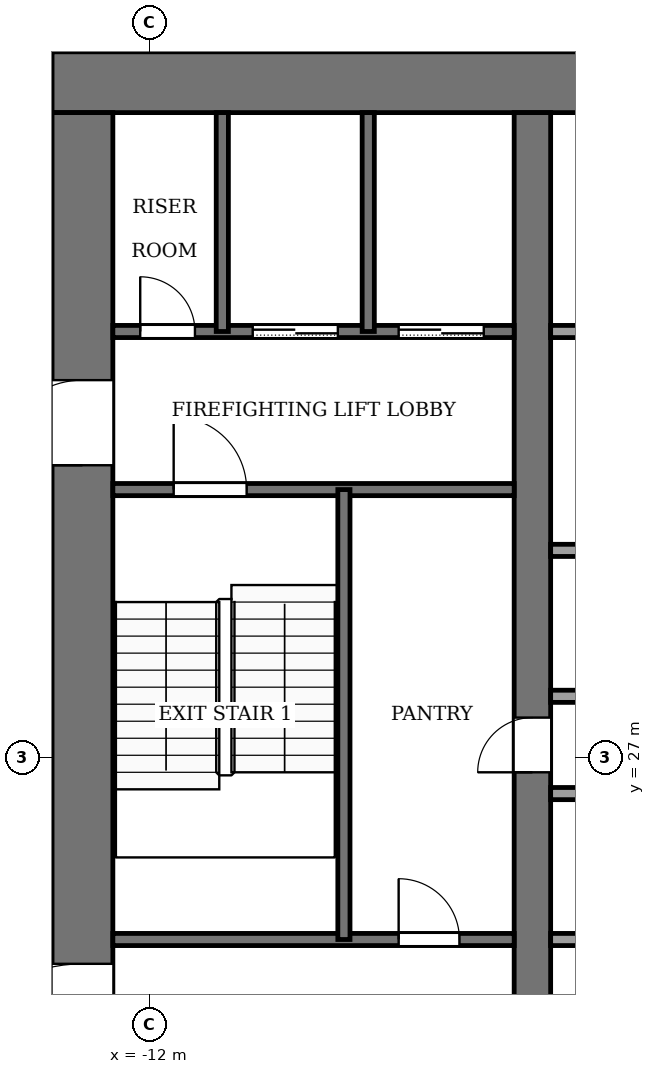
"""IFC4 building model, lengths in metres.
Left out: names, types, materials, properties, quantities, classifications, styles, units other than length and angle.
Written with IfcOpenShell. Run it as: python <this file> out.ifc"""

import sys

from ifc_helpers import new_model, si_unit, direction, frame, frame_2d, origin, place, context, subcontext, project, spatial, rectangle, extrude, element, fill, save


model = new_model("IFC4")
c1 = context("Model", 3, precision=1e-05, world=origin(), true_north=direction((0.0, 1.0)))
c2 = subcontext(c1, "Body", "Model", "MODEL_VIEW")
j1 = project(units=[si_unit("LENGTHUNIT", "METRE"), si_unit("PLANEANGLEUNIT", "RADIAN")], contexts=[c1])
p1 = place(None, origin())
s1 = spatial("IfcSite", under=j1, at=p1, CompositionType="ELEMENT")
p2 = place(p1, origin())
s2 = spatial("IfcBuilding", under=s1, at=p2, CompositionType="ELEMENT")
p3 = place(p2, frame((0.0, 0.0, 138.0)))
s3 = spatial("IfcBuildingStorey", under=s2, at=p3, CompositionType="ELEMENT", Elevation=138.0)
p4 = place(p3, frame((-13.6, 38.1, -0.13), z_axis=(0.0, 0.0, 1.0), x_axis=(1.0, 0.0, 0.0)))
e1 = element("IfcWall", 1, at=p4, inside=s3, PredefinedType="SHEAR", context=c2, shape_type="SweptSolid", body=[
    extrude(rectangle(XDim=27.2, YDim=1.0, at=frame_2d((13.6, 0.0))), origin(), (0.0, 0.0, 1.0), 4.0),
])
p5 = place(p3, frame((-13.1, 18.4, -0.13), z_axis=(0.0, 0.0, 1.0), x_axis=(0.0, 1.0, 0.0)))
e2 = element("IfcWall", 2, at=p5, inside=s3, PredefinedType="SHEAR", context=c2, shape_type="SweptSolid", body=[
    extrude(rectangle(XDim=19.2, YDim=1.0, at=frame_2d((9.6, 0.0))), origin(), (0.0, 0.0, 1.0), 4.0),
])
p6 = place(p5, frame((2.8, 0.0, 0.13)))
e3 = element("IfcOpeningElement", 3, at=p6, cuts=e2, PredefinedType="OPENING", context=c2, shape_type="SweptSolid", body=[
    extrude(rectangle(XDim=2.4, YDim=2.4, at=frame_2d((1.2, 1.2))), frame((0.0, 0.51, 0.0), z_axis=(0.0, -1.0, 0.0), x_axis=(1.0, 0.0, 0.0)), (0.0, 0.0, 1.0), 1.02),
])
p7 = place(p5, frame((13.4, 0.0, 0.13)))
e4 = element("IfcOpeningElement", 4, at=p7, cuts=e2, PredefinedType="OPENING", context=c2, shape_type="SweptSolid", body=[
    extrude(rectangle(XDim=1.4, YDim=2.2, at=frame_2d((0.7, 1.1))), frame((0.0, 0.51, 0.0), z_axis=(0.0, -1.0, 0.0), x_axis=(1.0, 0.0, 0.0)), (0.0, 0.0, 1.0), 1.02),
])
p8 = place(p3, frame((-5.7, 18.4, -0.13), z_axis=(0.0, 0.0, 1.0), x_axis=(0.0, 1.0, 0.0)))
e5 = element("IfcWall", 5, at=p8, inside=s3, PredefinedType="SHEAR", context=c2, shape_type="SweptSolid", body=[
    extrude(rectangle(XDim=19.2, YDim=0.6, at=frame_2d((9.6, 0.0))), origin(), (0.0, 0.0, 1.0), 4.0),
])
p9 = place(p8, frame((8.35, 0.0, 0.13)))
e6 = element("IfcOpeningElement", 6, at=p9, cuts=e5, PredefinedType="OPENING", context=c2, shape_type="SweptSolid", body=[
    extrude(rectangle(XDim=0.9, YDim=2.1, at=frame_2d((0.45, 1.05))), frame((0.0, 0.31, 0.0), z_axis=(0.0, -1.0, 0.0), x_axis=(1.0, 0.0, 0.0)), (0.0, 0.0, 1.0), 0.62),
])
p10 = place(p3, frame((-12.6, 24.0, 0.0), z_axis=(0.0, 0.0, 1.0), x_axis=(1.0, 0.0, 0.0)))
e7 = element("IfcWall", 7, at=p10, inside=s3, PredefinedType="PARTITIONING", context=c2, shape_type="SweptSolid", body=[
    extrude(rectangle(XDim=6.6, YDim=0.2, at=frame_2d((3.3, 0.0))), origin(), (0.0, 0.0, 1.0), 3.87),
])
p11 = place(p10, frame((4.7, 0.0, 0.0)))
e8 = element("IfcOpeningElement", 8, at=p11, cuts=e7, PredefinedType="OPENING", context=c2, shape_type="SweptSolid", body=[
    extrude(rectangle(XDim=1.0, YDim=2.1, at=frame_2d((0.5, 1.05))), frame((0.0, 0.11, 0.0), z_axis=(0.0, -1.0, 0.0), x_axis=(1.0, 0.0, 0.0)), (0.0, 0.0, 1.0), 0.22),
])
p12 = place(p3, frame((-5.4, 24.0, 0.0), z_axis=(0.0, 0.0, 1.0), x_axis=(1.0, 0.0, 0.0)))
e9 = element("IfcWall", 9, at=p12, inside=s3, PredefinedType="PARTITIONING", context=c2, shape_type="SweptSolid", body=[
    extrude(rectangle(XDim=10.8, YDim=0.2, at=frame_2d((5.4, 0.0))), origin(), (0.0, 0.0, 1.0), 3.87),
])
p13 = place(p12, frame((0.75, 0.0, 0.0)))
e10 = element("IfcOpeningElement", 10, at=p13, cuts=e9, PredefinedType="OPENING", context=c2, shape_type="SweptSolid", body=[
    extrude(rectangle(XDim=1.2, YDim=2.2, at=frame_2d((0.6, 1.1))), frame((0.0, 0.11, 0.0), z_axis=(0.0, -1.0, 0.0), x_axis=(1.0, 0.0, 0.0)), (0.0, 0.0, 1.0), 0.22),
])
p14 = place(p12, frame((3.45, 0.0, 0.0)))
e11 = element("IfcOpeningElement", 11, at=p14, cuts=e9, PredefinedType="OPENING", context=c2, shape_type="SweptSolid", body=[
    extrude(rectangle(XDim=1.2, YDim=2.2, at=frame_2d((0.6, 1.1))), frame((0.0, 0.11, 0.0), z_axis=(0.0, -1.0, 0.0), x_axis=(1.0, 0.0, 0.0)), (0.0, 0.0, 1.0), 0.22),
])
p15 = place(p12, frame((6.15, 0.0, 0.0)))
e12 = element("IfcOpeningElement", 12, at=p15, cuts=e9, PredefinedType="OPENING", context=c2, shape_type="SweptSolid", body=[
    extrude(rectangle(XDim=1.2, YDim=2.2, at=frame_2d((0.6, 1.1))), frame((0.0, 0.11, 0.0), z_axis=(0.0, -1.0, 0.0), x_axis=(1.0, 0.0, 0.0)), (0.0, 0.0, 1.0), 0.22),
])
p16 = place(p12, frame((8.85, 0.0, 0.0)))
e13 = element("IfcOpeningElement", 13, at=p16, cuts=e9, PredefinedType="OPENING", context=c2, shape_type="SweptSolid", body=[
    extrude(rectangle(XDim=1.2, YDim=2.2, at=frame_2d((0.6, 1.1))), frame((0.0, 0.11, 0.0), z_axis=(0.0, -1.0, 0.0), x_axis=(1.0, 0.0, 0.0)), (0.0, 0.0, 1.0), 0.22),
])
for number, where, z_axis, x_axis in (
    (14, (-5.4, 26.4, 0.0), (0.0, 0.0, 1.0), (1.0, 0.0, 0.0)),
    (15, (-5.4, 28.0, 0.0), (0.0, 0.0, 1.0), (1.0, 0.0, 0.0)),
    (16, (-5.4, 30.4, 0.0), (0.0, 0.0, 1.0), (1.0, 0.0, 0.0)),
):
    element("IfcWall", number, at=place(p3, frame(where, z_axis=z_axis, x_axis=x_axis)), inside=s3, PredefinedType="PARTITIONING", context=c2, shape_type="SweptSolid", body=[
        extrude(rectangle(XDim=10.8, YDim=0.2, at=frame_2d((5.4, 0.0))), origin(), (0.0, 0.0, 1.0), 3.87),
    ])
p17 = place(p3, frame((-12.6, 31.4, 0.0), z_axis=(0.0, 0.0, 1.0), x_axis=(1.0, 0.0, 0.0)))
e17 = element("IfcWall", 17, at=p17, inside=s3, PredefinedType="PARTITIONING", context=c2, shape_type="SweptSolid", body=[
    extrude(rectangle(XDim=6.6, YDim=0.2, at=frame_2d((3.3, 0.0))), origin(), (0.0, 0.0, 1.0), 3.87),
])
p18 = place(p17, frame((1.0, 0.0, 0.0)))
e18 = element("IfcOpeningElement", 18, at=p18, cuts=e17, PredefinedType="OPENING", context=c2, shape_type="SweptSolid", body=[
    extrude(rectangle(XDim=1.2, YDim=2.2, at=frame_2d((0.6, 1.1))), frame((0.0, 0.11, 0.0), z_axis=(0.0, -1.0, 0.0), x_axis=(1.0, 0.0, 0.0)), (0.0, 0.0, 1.0), 0.22),
])
p19 = place(p3, frame((-12.6, 34.0, 0.0), z_axis=(0.0, 0.0, 1.0), x_axis=(1.0, 0.0, 0.0)))
e19 = element("IfcWall", 19, at=p19, inside=s3, PredefinedType="PARTITIONING", context=c2, shape_type="SweptSolid", body=[
    extrude(rectangle(XDim=6.6, YDim=0.2, at=frame_2d((3.3, 0.0))), origin(), (0.0, 0.0, 1.0), 3.87),
])
p20 = place(p19, frame((4.7, 0.0, 0.0)))
e20 = element("IfcOpeningElement", 20, at=p20, cuts=e19, PredefinedType="OPENING", context=c2, shape_type="SweptSolid", body=[
    extrude(rectangle(XDim=1.4, YDim=2.2, at=frame_2d((0.7, 1.1))), frame((0.0, 0.11, 0.0), z_axis=(0.0, -1.0, 0.0), x_axis=(1.0, 0.0, 0.0)), (0.0, 0.0, 1.0), 0.22),
])
p21 = place(p19, frame((2.3, 0.0, 0.0)))
e21 = element("IfcOpeningElement", 21, at=p21, cuts=e19, PredefinedType="OPENING", context=c2, shape_type="SweptSolid", body=[
    extrude(rectangle(XDim=1.4, YDim=2.2, at=frame_2d((0.7, 1.1))), frame((0.0, 0.11, 0.0), z_axis=(0.0, -1.0, 0.0), x_axis=(1.0, 0.0, 0.0)), (0.0, 0.0, 1.0), 0.22),
])
p22 = place(p19, frame((0.45, 0.0, 0.0)))
e22 = element("IfcOpeningElement", 22, at=p22, cuts=e19, PredefinedType="OPENING", context=c2, shape_type="SweptSolid", body=[
    extrude(rectangle(XDim=0.9, YDim=2.1, at=frame_2d((0.45, 1.05))), frame((0.0, 0.11, 0.0), z_axis=(0.0, -1.0, 0.0), x_axis=(1.0, 0.0, 0.0)), (0.0, 0.0, 1.0), 0.22),
])
p23 = place(p3, frame((-5.4, 34.0, 0.0), z_axis=(0.0, 0.0, 1.0), x_axis=(1.0, 0.0, 0.0)))
e23 = element("IfcWall", 23, at=p23, inside=s3, PredefinedType="PARTITIONING", context=c2, shape_type="SweptSolid", body=[
    extrude(rectangle(XDim=10.8, YDim=0.2, at=frame_2d((5.4, 0.0))), origin(), (0.0, 0.0, 1.0), 3.87),
])
p24 = place(p23, frame((6.15, 0.0, 0.0)))
e24 = element("IfcOpeningElement", 24, at=p24, cuts=e23, PredefinedType="OPENING", context=c2, shape_type="SweptSolid", body=[
    extrude(rectangle(XDim=1.2, YDim=2.2, at=frame_2d((0.6, 1.1))), frame((0.0, 0.11, 0.0), z_axis=(0.0, -1.0, 0.0), x_axis=(1.0, 0.0, 0.0)), (0.0, 0.0, 1.0), 0.22),
])
p25 = place(p23, frame((8.95, 0.0, 0.0)))
e25 = element("IfcOpeningElement", 25, at=p25, cuts=e23, PredefinedType="OPENING", context=c2, shape_type="SweptSolid", body=[
    extrude(rectangle(XDim=1.0, YDim=2.1, at=frame_2d((0.5, 1.05))), frame((0.0, 0.11, 0.0), z_axis=(0.0, -1.0, 0.0), x_axis=(1.0, 0.0, 0.0)), (0.0, 0.0, 1.0), 0.22),
])
p26 = place(p3, frame((-10.8, 34.0, 0.0), z_axis=(0.0, 0.0, 1.0), x_axis=(0.0, 1.0, 0.0)))
e26 = element("IfcWall", 26, at=p26, inside=s3, PredefinedType="PARTITIONING", context=c2, shape_type="SweptSolid", body=[
    extrude(rectangle(XDim=3.6, YDim=0.2, at=frame_2d((1.8, 0.0))), origin(), (0.0, 0.0, 1.0), 3.87),
])
p27 = place(p3, frame((-8.8, 24.0, 0.0), z_axis=(0.0, 0.0, 1.0), x_axis=(0.0, 1.0, 0.0)))
e27 = element("IfcWall", 27, at=p27, inside=s3, PredefinedType="PARTITIONING", context=c2, shape_type="SweptSolid", body=[
    extrude(rectangle(XDim=7.4, YDim=0.2, at=frame_2d((3.7, 0.0))), origin(), (0.0, 0.0, 1.0), 3.87),
])
p28 = place(p3, frame((-8.4, 34.0, 0.0), z_axis=(0.0, 0.0, 1.0), x_axis=(0.0, 1.0, 0.0)))
e28 = element("IfcWall", 28, at=p28, inside=s3, PredefinedType="PARTITIONING", context=c2, shape_type="SweptSolid", body=[
    extrude(rectangle(XDim=3.6, YDim=0.2, at=frame_2d((1.8, 0.0))), origin(), (0.0, 0.0, 1.0), 3.87),
])
p29 = place(p20, origin())
e29 = element("IfcDoor", 29, at=p29, inside=s3, OperationType="SLIDING_TO_LEFT", PredefinedType="DOOR", context=c2, shape_type="SweptSolid", body=[
    extrude(rectangle(XDim=1.4, YDim=2.2, at=frame_2d((0.7, 1.1))), frame((0.0, 0.025, 0.0), z_axis=(0.0, -1.0, 0.0), x_axis=(1.0, 0.0, 0.0)), (0.0, 0.0, 1.0), 0.05),
])
fill(e20, e29)
p30 = place(p21, origin())
e30 = element("IfcDoor", 30, at=p30, inside=s3, OperationType="SLIDING_TO_LEFT", PredefinedType="DOOR", context=c2, shape_type="SweptSolid", body=[
    extrude(rectangle(XDim=1.4, YDim=2.2, at=frame_2d((0.7, 1.1))), frame((0.0, 0.025, 0.0), z_axis=(0.0, -1.0, 0.0), x_axis=(1.0, 0.0, 0.0)), (0.0, 0.0, 1.0), 0.05),
])
fill(e21, e30)
p31 = place(p22, origin())
e31 = element("IfcDoor", 31, at=p31, inside=s3, OperationType="SINGLE_SWING_RIGHT", PredefinedType="DOOR", context=c2, shape_type="SweptSolid", body=[
    extrude(rectangle(XDim=0.9, YDim=2.1, at=frame_2d((0.45, 1.05))), frame((0.0, 0.025, 0.0), z_axis=(0.0, -1.0, 0.0), x_axis=(1.0, 0.0, 0.0)), (0.0, 0.0, 1.0), 0.05),
])
fill(e22, e31)
p32 = place(p11, origin())
e32 = element("IfcDoor", 32, at=p32, inside=s3, OperationType="SINGLE_SWING_RIGHT", PredefinedType="DOOR", context=c2, shape_type="SweptSolid", body=[
    extrude(rectangle(XDim=1.0, YDim=2.1, at=frame_2d((0.5, 1.05))), frame((0.0, 0.025, 0.0), z_axis=(0.0, -1.0, 0.0), x_axis=(1.0, 0.0, 0.0)), (0.0, 0.0, 1.0), 0.05),
])
fill(e8, e32)
p33 = place(p9, origin())
e33 = element("IfcDoor", 33, at=p33, inside=s3, OperationType="SINGLE_SWING_LEFT", PredefinedType="DOOR", context=c2, shape_type="SweptSolid", body=[
    extrude(rectangle(XDim=0.9, YDim=2.1, at=frame_2d((0.45, 1.05))), frame((0.0, 0.025, 0.0), z_axis=(0.0, -1.0, 0.0), x_axis=(1.0, 0.0, 0.0)), (0.0, 0.0, 1.0), 0.05),
])
fill(e6, e33)
p34 = place(p18, origin())
e34 = element("IfcDoor", 34, at=p34, inside=s3, OperationType="SINGLE_SWING_LEFT", PredefinedType="DOOR", context=c2, shape_type="SweptSolid", body=[
    extrude(rectangle(XDim=1.2, YDim=2.2, at=frame_2d((0.6, 1.1))), frame((0.0, 0.025, 0.0), z_axis=(0.0, -1.0, 0.0), x_axis=(1.0, 0.0, 0.0)), (0.0, 0.0, 1.0), 0.05),
])
fill(e18, e34)
p35 = place(p6, origin())
e35 = element("IfcDoor", 35, at=p35, inside=s3, OperationType="DOUBLE_DOOR_SINGLE_SWING", PredefinedType="DOOR", context=c2, shape_type="SweptSolid", body=[
    extrude(rectangle(XDim=2.4, YDim=2.4, at=frame_2d((1.2, 1.2))), frame((0.0, 0.025, 0.0), z_axis=(0.0, -1.0, 0.0), x_axis=(1.0, 0.0, 0.0)), (0.0, 0.0, 1.0), 0.05),
])
fill(e3, e35)
p36 = place(p7, origin())
e36 = element("IfcDoor", 36, at=p36, inside=s3, OperationType="SINGLE_SWING_LEFT", PredefinedType="DOOR", context=c2, shape_type="SweptSolid", body=[
    extrude(rectangle(XDim=1.4, YDim=2.2, at=frame_2d((0.7, 1.1))), frame((0.0, 0.025, 0.0), z_axis=(0.0, -1.0, 0.0), x_axis=(1.0, 0.0, 0.0)), (0.0, 0.0, 1.0), 0.05),
])
fill(e4, e36)
save(model, sys.argv[1])
